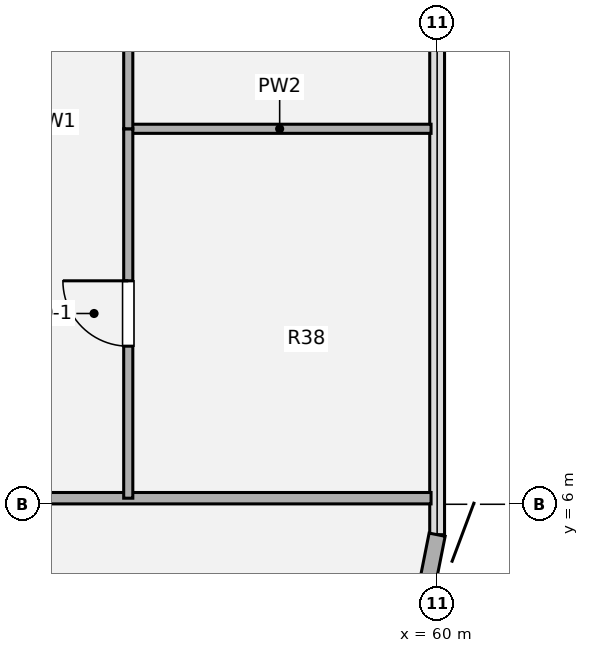
"""IFC4 building model, lengths in metres.
Left out: names, types, materials, properties, quantities, classifications, styles, units other than length and angle.
Written with IfcOpenShell. Run it as: python <this file> out.ifc"""

import sys

from ifc_helpers import new_model, si_unit, direction, frame, frame_2d, origin, origin_2d, place, context, subcontext, project, spatial, rectangle, extrude, source, transform, mapped, element, fill, save


model = new_model("IFC4")
c1 = context("Model", 3, precision=1e-05, world=origin(), true_north=direction((0.0, 1.0)))
c2 = subcontext(c1, "Body", "Model", "MODEL_VIEW")
j1 = project(units=[si_unit("LENGTHUNIT", "METRE"), si_unit("PLANEANGLEUNIT", "RADIAN")], contexts=[c1])
p1 = place(None, origin())
s1 = spatial("IfcSite", under=j1, at=p1, CompositionType="ELEMENT")
p2 = place(p1, origin())
s2 = spatial("IfcBuilding", under=s1, at=p2, CompositionType="ELEMENT")
p3 = place(p2, frame((0.0, 0.0, 76.14)))
s3 = spatial("IfcBuildingStorey", under=s2, at=p3, CompositionType="ELEMENT", Elevation=76.14)
p4 = place(p3, frame((60.0, 5.6, 0.0), z_axis=(0.0, 0.0, 1.0), x_axis=(-0.195138390419, -0.980775717779, 0.0)))
e1 = element("IfcWall", 1, at=p4, inside=s3, PredefinedType="SOLIDWALL", context=c2, shape_type="SweptSolid", body=[
    extrude(rectangle(XDim=1.249, YDim=0.215, at=frame_2d((0.624, 0.0))), origin(), (0.0, 0.0, 1.0), 3.372),
])
p5 = place(p3, frame((49.9, 6.08, 0.0), z_axis=(0.0, 0.0, 1.0), x_axis=(1.0, 0.0, 0.0)))
e2 = element("IfcWall", 2, at=p5, inside=s3, PredefinedType="PARTITIONING", context=c2, shape_type="SweptSolid", body=[
    extrude(rectangle(XDim=10.02, YDim=0.15, at=frame_2d((5.01, 0.0))), origin(), (0.0, 0.0, 1.0), 3.342),
])
p6 = place(p3, frame((55.936, 10.94, 0.0), z_axis=(0.0, 0.0, 1.0), x_axis=(1.0, 0.0, 0.0)))
e3 = element("IfcWall", 3, at=p6, inside=s3, PredefinedType="PARTITIONING", context=c2, shape_type="SweptSolid", body=[
    extrude(rectangle(XDim=3.984, YDim=0.12, at=frame_2d((1.992, 0.0))), origin(), (0.0, 0.0, 1.0), 3.342),
])
p7 = place(p3, frame((55.936, 6.08, 0.0), z_axis=(0.0, 0.0, 1.0), x_axis=(0.0, 1.0, 0.0)))
e4 = element("IfcWall", 4, at=p7, inside=s3, PredefinedType="PARTITIONING", context=c2, shape_type="SweptSolid", body=[
    extrude(rectangle(XDim=4.86, YDim=0.12, at=frame_2d((2.43, 0.0))), origin(), (0.0, 0.0, 1.0), 3.342),
])
p8 = place(p7, frame((2.0, 0.0, 0.0)))
e5 = element("IfcOpeningElement", 5, at=p8, cuts=e4, PredefinedType="OPENING", context=c2, shape_type="SweptSolid", body=[
    extrude(rectangle(XDim=0.86, YDim=2.1, at=origin_2d()), frame((0.43, 0.07, 1.05), z_axis=(0.0, -1.0, 0.0), x_axis=(1.0, 0.0, 0.0)), (0.0, 0.0, 1.0), 0.14),
])
p9 = place(p3, frame((55.936, 10.94, 0.0), z_axis=(0.0, 0.0, 1.0), x_axis=(0.0, 1.0, 0.0)))
e6 = element("IfcWall", 6, at=p9, inside=s3, PredefinedType="PARTITIONING", context=c2, shape_type="SweptSolid", body=[
    extrude(rectangle(XDim=4.86, YDim=0.12, at=frame_2d((2.43, 0.0))), origin(), (0.0, 0.0, 1.0), 3.342),
])
p10 = place(p9, frame((2.0, 0.0, 0.0)))
e7 = element("IfcOpeningElement", 7, at=p10, cuts=e6, PredefinedType="OPENING", context=c2, shape_type="SweptSolid", body=[
    extrude(rectangle(XDim=0.86, YDim=2.1, at=origin_2d()), frame((0.43, 0.07, 1.05), z_axis=(0.0, -1.0, 0.0), x_axis=(1.0, 0.0, 0.0)), (0.0, 0.0, 1.0), 0.14),
])
m1 = source(origin(), c2, "Body", "SweptSolid", [
    extrude(rectangle(XDim=0.86, YDim=2.1, at=origin_2d()), frame((0.43, 0.025, 1.05), z_axis=(0.0, -1.0, 0.0), x_axis=(1.0, 0.0, 0.0)), (0.0, 0.0, 1.0), 0.05),
])
p11 = place(p8, origin())
e8 = element("IfcDoor", 8, at=p11, inside=s3, OperationType="SINGLE_SWING_RIGHT", PredefinedType="DOOR", context=c2, shape_type="MappedRepresentation", body=[
    mapped(m1, transform((0.0, 0.0, 0.0), x_axis=(1.0, 0.0, 0.0), y_axis=(0.0, 1.0, 0.0), z_axis=(0.0, 0.0, 1.0), scale=1.0)),
])
fill(e5, e8)
save(model, sys.argv[1])
